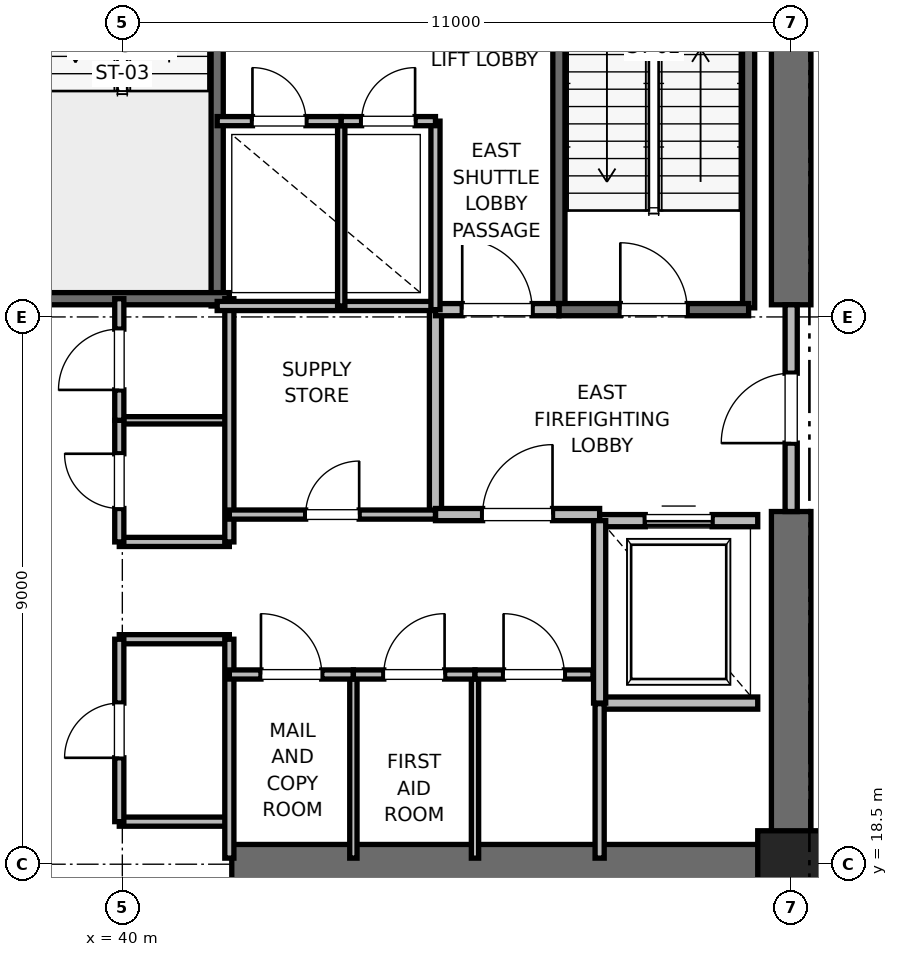
"""IFC4 building model, lengths in metres.
Left out: names, types, materials, properties, quantities, classifications, styles, units other than length and angle.
Written with IfcOpenShell. Run it as: python <this file> out.ifc"""

import sys

from ifc_helpers import new_model, si_unit, direction, frame, frame_2d, origin, origin_2d, place, context, subcontext, project, spatial, rectangle, extrude, element, fill, save


model = new_model("IFC4")
c1 = context("Model", 3, precision=1e-05, world=origin(), true_north=direction((0.0, 1.0)))
c2 = subcontext(c1, "Body", "Model", "MODEL_VIEW")
j1 = project(units=[si_unit("LENGTHUNIT", "METRE"), si_unit("PLANEANGLEUNIT", "RADIAN")], contexts=[c1])
p1 = place(None, origin())
s1 = spatial("IfcSite", under=j1, at=p1, CompositionType="ELEMENT")
p2 = place(p1, origin())
s2 = spatial("IfcBuilding", under=s1, at=p2, CompositionType="ELEMENT")
p3 = place(p2, frame((0.0, 0.0, 51.6)))
s3 = spatial("IfcBuildingStorey", under=s2, at=p3, CompositionType="ELEMENT", Elevation=51.6)
p4 = place(p3, frame((51.0, 18.5, 0.0), z_axis=(0.0, 0.0, 1.0), x_axis=(1.0, 0.0, 0.0)))
e1 = element("IfcColumn", 1, at=p4, inside=s3, PredefinedType="PILASTER", context=c2, shape_type="SweptSolid", body=[
    extrude(rectangle(XDim=1.1, YDim=1.1, at=origin_2d()), origin(), (0.0, 0.0, 1.0), 4.0),
])
p5 = place(p3, frame((41.8, 18.5, 0.0), z_axis=(0.0, 0.0, 1.0), x_axis=(1.0, 0.0, 0.0)))
e2 = element("IfcWall", 2, at=p5, inside=s3, PredefinedType="SHEAR", context=c2, shape_type="SweptSolid", body=[
    extrude(rectangle(XDim=9.2, YDim=0.65, at=frame_2d((4.6, 0.0))), origin(), (0.0, 0.0, 1.0), 3.76),
])
p6 = place(p3, frame((51.0, 18.5, 0.0), z_axis=(0.0, 0.0, 1.0), x_axis=(0.0, 1.0, 0.0)))
e3 = element("IfcWall", 3, at=p6, inside=s3, PredefinedType="SHEAR", context=c2, shape_type="SweptSolid", body=[
    extrude(rectangle(XDim=5.8, YDim=0.65, at=frame_2d((2.9, 0.0))), origin(), (0.0, 0.0, 1.0), 3.76),
])
p7 = place(p3, frame((51.0, 27.7, 0.0), z_axis=(0.0, 0.0, 1.0), x_axis=(0.0, 1.0, 0.0)))
e4 = element("IfcWall", 4, at=p7, inside=s3, PredefinedType="SHEAR", context=c2, shape_type="SweptSolid", body=[
    extrude(rectangle(XDim=8.8, YDim=0.65, at=frame_2d((4.4, 0.0))), origin(), (0.0, 0.0, 1.0), 3.76),
])
p8 = place(p3, frame((50.3, 27.65, 0.0), z_axis=(0.0, 0.0, 1.0), x_axis=(0.0, 1.0, 0.0)))
e5 = element("IfcWall", 5, at=p8, inside=s3, PredefinedType="SOLIDWALL", context=c2, shape_type="SweptSolid", body=[
    extrude(rectangle(XDim=8.15, YDim=0.2, at=frame_2d((4.075, 0.0))), origin(), (0.0, 0.0, 1.0), 3.76),
])
p9 = place(p3, frame((47.18, 27.62, 0.0), z_axis=(0.0, 0.0, 1.0), x_axis=(0.0, 1.0, 0.0)))
e6 = element("IfcWall", 6, at=p9, inside=s3, PredefinedType="SOLIDWALL", context=c2, shape_type="SweptSolid", body=[
    extrude(rectangle(XDim=8.18, YDim=0.2, at=frame_2d((4.09, 0.0))), origin(), (0.0, 0.0, 1.0), 3.76),
])
p10 = place(p3, frame((47.18, 27.62, 0.0), z_axis=(0.0, 0.0, 1.0), x_axis=(1.0, 0.0, 0.0)))
e7 = element("IfcWall", 7, at=p10, inside=s3, PredefinedType="SOLIDWALL", context=c2, shape_type="SweptSolid", body=[
    extrude(rectangle(XDim=3.12, YDim=0.2, at=frame_2d((1.56, 0.0))), origin(), (0.0, 0.0, 1.0), 3.76),
])
p11 = place(p10, frame((1.01, 0.0, 0.0)))
e8 = element("IfcOpeningElement", 8, at=p11, cuts=e7, PredefinedType="OPENING", context=c2, shape_type="SweptSolid", body=[
    extrude(rectangle(XDim=1.1, YDim=2.15, at=frame_2d((0.55, 1.075))), frame((0.0, 0.1, 0.0), z_axis=(0.0, -1.0, 0.0), x_axis=(1.0, 0.0, 0.0)), (0.0, 0.0, 1.0), 0.2),
])
p12 = place(p3, frame((41.56, 27.68, 0.0), z_axis=(0.0, 0.0, 1.0), x_axis=(0.0, 1.0, 0.0)))
e9 = element("IfcWall", 9, at=p12, inside=s3, PredefinedType="SOLIDWALL", context=c2, shape_type="SweptSolid", body=[
    extrude(rectangle(XDim=8.57, YDim=0.2, at=frame_2d((4.285, 0.0))), origin(), (0.0, 0.0, 1.0), 3.76),
])
p13 = place(p3, frame((38.44, 27.8, 0.0), z_axis=(0.0, 0.0, 1.0), x_axis=(1.0, 0.0, 0.0)))
e10 = element("IfcWall", 10, at=p13, inside=s3, PredefinedType="SOLIDWALL", context=c2, shape_type="SweptSolid", body=[
    extrude(rectangle(XDim=3.32, YDim=0.2, at=frame_2d((1.66, 0.0))), origin(), (0.0, 0.0, 1.0), 3.76),
])
p14 = place(p3, frame((45.15, 24.25, 0.0), z_axis=(0.0, 0.0, 1.0), x_axis=(0.0, 1.0, 0.0)))
e11 = element("IfcWall", 11, at=p14, inside=s3, PredefinedType="PARTITIONING", context=c2, shape_type="SweptSolid", body=[
    extrude(rectangle(XDim=3.37, YDim=0.2, at=frame_2d((1.685, 0.0))), origin(), (0.0, 0.0, 1.0), 3.76),
])
p15 = place(p3, frame((45.15, 24.25, 0.0), z_axis=(0.0, 0.0, 1.0), x_axis=(1.0, 0.0, 0.0)))
e12 = element("IfcWall", 12, at=p15, inside=s3, PredefinedType="PARTITIONING", context=c2, shape_type="SweptSolid", body=[
    extrude(rectangle(XDim=2.7, YDim=0.2, at=frame_2d((1.35, 0.0))), origin(), (0.0, 0.0, 1.0), 3.76),
])
p16 = place(p15, frame((0.775, 0.0, 0.0)))
e13 = element("IfcOpeningElement", 13, at=p16, cuts=e12, PredefinedType="OPENING", context=c2, shape_type="SweptSolid", body=[
    extrude(rectangle(XDim=1.15, YDim=2.2, at=frame_2d((0.575, 1.1))), frame((0.0, 0.1, 0.0), z_axis=(0.0, -1.0, 0.0), x_axis=(1.0, 0.0, 0.0)), (0.0, 0.0, 1.0), 0.2),
])
p17 = place(p3, frame((45.15, 27.62, 0.0), z_axis=(0.0, 0.0, 1.0), x_axis=(1.0, 0.0, 0.0)))
e14 = element("IfcWall", 14, at=p17, inside=s3, PredefinedType="PARTITIONING", context=c2, shape_type="SweptSolid", body=[
    extrude(rectangle(XDim=2.03, YDim=0.2, at=frame_2d((1.015, 0.0))), origin(), (0.0, 0.0, 1.0), 3.76),
])
p18 = place(p17, frame((0.44, 0.0, 0.0)))
e15 = element("IfcOpeningElement", 15, at=p18, cuts=e14, PredefinedType="OPENING", context=c2, shape_type="SweptSolid", body=[
    extrude(rectangle(XDim=1.15, YDim=2.2, at=frame_2d((0.575, 1.1))), frame((0.0, 0.1, 0.0), z_axis=(0.0, -1.0, 0.0), x_axis=(1.0, 0.0, 0.0)), (0.0, 0.0, 1.0), 0.2),
])
p19 = place(p3, frame((51.0, 24.3, 0.0), z_axis=(0.0, 0.0, 1.0), x_axis=(0.0, 1.0, 0.0)))
e16 = element("IfcWall", 16, at=p19, inside=s3, PredefinedType="PARTITIONING", context=c2, shape_type="SweptSolid", body=[
    extrude(rectangle(XDim=3.4, YDim=0.2, at=frame_2d((1.7, 0.0))), origin(), (0.0, 0.0, 1.0), 2.54),
])
p20 = place(p19, frame((1.125, 0.0, 0.0)))
e17 = element("IfcOpeningElement", 17, at=p20, cuts=e16, PredefinedType="OPENING", context=c2, shape_type="SweptSolid", body=[
    extrude(rectangle(XDim=1.15, YDim=2.2, at=frame_2d((0.575, 1.1))), frame((0.0, 0.1, 0.0), z_axis=(0.0, -1.0, 0.0), x_axis=(1.0, 0.0, 0.0)), (0.0, 0.0, 1.0), 0.2),
])
p21 = place(p3, frame((47.85, 21.15, 0.0), z_axis=(0.0, 0.0, 1.0), x_axis=(1.0, 0.0, 0.0)))
e18 = element("IfcWall", 18, at=p21, inside=s3, PredefinedType="SOLIDWALL", context=c2, shape_type="SweptSolid", body=[
    extrude(rectangle(XDim=2.6, YDim=0.2, at=frame_2d((1.3, 0.0))), origin(), (0.0, 0.0, 1.0), 3.76),
])
p22 = place(p3, frame((50.45, 24.15, 0.0), z_axis=(0.0, 0.0, 1.0), x_axis=(-1.0, 0.0, 0.0)))
e19 = element("IfcWall", 19, at=p22, inside=s3, PredefinedType="SOLIDWALL", context=c2, shape_type="SweptSolid", body=[
    extrude(rectangle(XDim=2.6, YDim=0.2, at=frame_2d((1.3, 0.0))), origin(), (0.0, 0.0, 1.0), 2.54),
])
p23 = place(p22, frame((0.75, 0.0, 0.0)))
e20 = element("IfcOpeningElement", 20, at=p23, cuts=e19, PredefinedType="OPENING", context=c2, shape_type="SweptSolid", body=[
    extrude(rectangle(XDim=1.1, YDim=2.2, at=frame_2d((0.55, 1.1))), frame((0.0, 0.1, 0.0), z_axis=(0.0, -1.0, 0.0), x_axis=(1.0, 0.0, 0.0)), (0.0, 0.0, 1.0), 0.2),
])
p24 = place(p3, frame((47.85, 24.15, 0.0), z_axis=(0.0, 0.0, 1.0), x_axis=(0.0, -1.0, 0.0)))
e21 = element("IfcWall", 21, at=p24, inside=s3, PredefinedType="SOLIDWALL", context=c2, shape_type="SweptSolid", body=[
    extrude(rectangle(XDim=3.0, YDim=0.2, at=frame_2d((1.5, 0.0))), origin(), (0.0, 0.0, 1.0), 3.76),
])
for number, where, z_axis, x_axis in (
    (22, (39.95, 19.2, 0.0), (0.0, 0.0, 1.0), (1.0, 0.0, 0.0)),
    (23, (39.95, 22.2, 0.0), (0.0, 0.0, 1.0), (1.0, 0.0, 0.0)),
    (24, (39.95, 23.8, 0.0), (0.0, 0.0, 1.0), (1.0, 0.0, 0.0)),
):
    element("IfcWall", number, at=place(p3, frame(where, z_axis=z_axis, x_axis=x_axis)), inside=s3, PredefinedType="PARTITIONING", context=c2, shape_type="SweptSolid", body=[
        extrude(rectangle(XDim=1.81, YDim=0.15, at=frame_2d((0.905, 0.0))), origin(), (0.0, 0.0, 1.0), 2.85),
    ])
p25 = place(p3, frame((39.95, 25.8, 0.0), z_axis=(0.0, 0.0, 1.0), x_axis=(1.0, 0.0, 0.0)))
e25 = element("IfcWall", 25, at=p25, inside=s3, PredefinedType="PARTITIONING", context=c2, shape_type="SweptSolid", body=[
    extrude(rectangle(XDim=1.81, YDim=0.12, at=frame_2d((0.905, 0.0))), origin(), (0.0, 0.0, 1.0), 2.85),
])
p26 = place(p3, frame((41.76, 18.6, 0.0), z_axis=(0.0, 0.0, 1.0), x_axis=(0.0, 1.0, 0.0)))
e26 = element("IfcWall", 26, at=p26, inside=s3, PredefinedType="PARTITIONING", context=c2, shape_type="SweptSolid", body=[
    extrude(rectangle(XDim=3.6, YDim=0.15, at=frame_2d((1.8, 0.0))), origin(), (0.0, 0.0, 1.0), 2.54),
])
p27 = place(p3, frame((41.76, 23.8, 0.0), z_axis=(0.0, 0.0, 1.0), x_axis=(0.0, 1.0, 0.0)))
e27 = element("IfcWall", 27, at=p27, inside=s3, PredefinedType="PARTITIONING", context=c2, shape_type="SweptSolid", body=[
    extrude(rectangle(XDim=4.0, YDim=0.15, at=frame_2d((2.0, 0.0))), origin(), (0.0, 0.0, 1.0), 2.85),
])
p28 = place(p3, frame((39.95, 19.2, 0.0), z_axis=(0.0, 0.0, 1.0), x_axis=(0.0, 1.0, 0.0)))
e28 = element("IfcWall", 28, at=p28, inside=s3, PredefinedType="PARTITIONING", context=c2, shape_type="SweptSolid", body=[
    extrude(rectangle(XDim=3.0, YDim=0.15, at=frame_2d((1.5, 0.0))), origin(), (0.0, 0.0, 1.0), 2.85),
])
p29 = place(p28, frame((1.05, 0.0, 0.0)))
e29 = element("IfcOpeningElement", 29, at=p29, cuts=e28, PredefinedType="OPENING", context=c2, shape_type="SweptSolid", body=[
    extrude(rectangle(XDim=0.9, YDim=2.1, at=frame_2d((0.45, 1.05))), frame((0.0, 0.075, 0.0), z_axis=(0.0, -1.0, 0.0), x_axis=(1.0, 0.0, 0.0)), (0.0, 0.0, 1.0), 0.15),
])
p30 = place(p3, frame((39.95, 23.8, 0.0), z_axis=(0.0, 0.0, 1.0), x_axis=(0.0, 1.0, 0.0)))
e30 = element("IfcWall", 30, at=p30, inside=s3, PredefinedType="PARTITIONING", context=c2, shape_type="SweptSolid", body=[
    extrude(rectangle(XDim=2.0, YDim=0.15, at=frame_2d((1.0, 0.0))), origin(), (0.0, 0.0, 1.0), 2.85),
])
p31 = place(p30, frame((0.55, 0.0, 0.0)))
e31 = element("IfcOpeningElement", 31, at=p31, cuts=e30, PredefinedType="OPENING", context=c2, shape_type="SweptSolid", body=[
    extrude(rectangle(XDim=0.9, YDim=2.1, at=frame_2d((0.45, 1.05))), frame((0.0, 0.075, 0.0), z_axis=(0.0, -1.0, 0.0), x_axis=(1.0, 0.0, 0.0)), (0.0, 0.0, 1.0), 0.15),
])
p32 = place(p3, frame((39.95, 25.8, 0.0), z_axis=(0.0, 0.0, 1.0), x_axis=(0.0, 1.0, 0.0)))
e32 = element("IfcWall", 32, at=p32, inside=s3, PredefinedType="PARTITIONING", context=c2, shape_type="SweptSolid", body=[
    extrude(rectangle(XDim=2.0, YDim=0.15, at=frame_2d((1.0, 0.0))), origin(), (0.0, 0.0, 1.0), 2.85),
])
p33 = place(p32, frame((0.5, 0.0, 0.0)))
e33 = element("IfcOpeningElement", 33, at=p33, cuts=e32, PredefinedType="OPENING", context=c2, shape_type="SweptSolid", body=[
    extrude(rectangle(XDim=1.0, YDim=2.15, at=frame_2d((0.5, 1.075))), frame((0.0, 0.075, 0.0), z_axis=(0.0, -1.0, 0.0), x_axis=(1.0, 0.0, 0.0)), (0.0, 0.0, 1.0), 0.15),
])
p34 = place(p3, frame((41.56, 27.68, 0.0), z_axis=(0.0, 0.0, 1.0), x_axis=(1.0, 0.0, 0.0)))
e34 = element("IfcWall", 34, at=p34, inside=s3, PredefinedType="PARTITIONING", context=c2, shape_type="SweptSolid", body=[
    extrude(rectangle(XDim=3.59, YDim=0.15, at=frame_2d((1.795, 0.0))), origin(), (0.0, 0.0, 1.0), 2.85),
])
p35 = place(p3, frame((47.85, 18.6, 0.0), z_axis=(0.0, 0.0, 1.0), x_axis=(0.0, 1.0, 0.0)))
e35 = element("IfcWall", 35, at=p35, inside=s3, PredefinedType="PARTITIONING", context=c2, shape_type="SweptSolid", body=[
    extrude(rectangle(XDim=2.54, YDim=0.15, at=frame_2d((1.27, 0.0))), origin(), (0.0, 0.0, 1.0), 2.85),
])
for number, where, z_axis, x_axis in (
    (36, (43.8, 18.6, 0.0), (0.0, 0.0, 1.0), (0.0, 1.0, 0.0)),
    (37, (45.8, 18.6, 0.0), (0.0, 0.0, 1.0), (0.0, 1.0, 0.0)),
):
    element("IfcWall", number, at=place(p3, frame(where, z_axis=z_axis, x_axis=x_axis)), inside=s3, PredefinedType="PARTITIONING", context=c2, shape_type="SweptSolid", body=[
        extrude(rectangle(XDim=3.02, YDim=0.12, at=frame_2d((1.51, 0.0))), origin(), (0.0, 0.0, 1.0), 2.85),
    ])
p36 = place(p3, frame((41.76, 21.62, 0.0), z_axis=(0.0, 0.0, 1.0), x_axis=(1.0, 0.0, 0.0)))
e38 = element("IfcWall", 38, at=p36, inside=s3, PredefinedType="PARTITIONING", context=c2, shape_type="SweptSolid", body=[
    extrude(rectangle(XDim=2.04, YDim=0.15, at=frame_2d((1.02, 0.0))), origin(), (0.0, 0.0, 1.0), 2.85),
])
p37 = place(p36, frame((0.52, 0.0, 0.0)))
e39 = element("IfcOpeningElement", 39, at=p37, cuts=e38, PredefinedType="OPENING", context=c2, shape_type="SweptSolid", body=[
    extrude(rectangle(XDim=1.0, YDim=2.15, at=frame_2d((0.5, 1.075))), frame((0.0, 0.075, 0.0), z_axis=(0.0, -1.0, 0.0), x_axis=(1.0, 0.0, 0.0)), (0.0, 0.0, 1.0), 0.15),
])
p38 = place(p3, frame((43.8, 21.62, 0.0), z_axis=(0.0, 0.0, 1.0), x_axis=(1.0, 0.0, 0.0)))
e40 = element("IfcWall", 40, at=p38, inside=s3, PredefinedType="PARTITIONING", context=c2, shape_type="SweptSolid", body=[
    extrude(rectangle(XDim=2.0, YDim=0.15, at=frame_2d((1.0, 0.0))), origin(), (0.0, 0.0, 1.0), 2.85),
])
p39 = place(p38, frame((0.5, 0.0, 0.0)))
e41 = element("IfcOpeningElement", 41, at=p39, cuts=e40, PredefinedType="OPENING", context=c2, shape_type="SweptSolid", body=[
    extrude(rectangle(XDim=1.0, YDim=2.15, at=frame_2d((0.5, 1.075))), frame((0.0, 0.075, 0.0), z_axis=(0.0, -1.0, 0.0), x_axis=(1.0, 0.0, 0.0)), (0.0, 0.0, 1.0), 0.15),
])
p40 = place(p3, frame((45.8, 21.62, 0.0), z_axis=(0.0, 0.0, 1.0), x_axis=(1.0, 0.0, 0.0)))
e42 = element("IfcWall", 42, at=p40, inside=s3, PredefinedType="PARTITIONING", context=c2, shape_type="SweptSolid", body=[
    extrude(rectangle(XDim=1.94, YDim=0.15, at=frame_2d((0.97, 0.0))), origin(), (0.0, 0.0, 1.0), 2.85),
])
p41 = place(p40, frame((0.47, 0.0, 0.0)))
e43 = element("IfcOpeningElement", 43, at=p41, cuts=e42, PredefinedType="OPENING", context=c2, shape_type="SweptSolid", body=[
    extrude(rectangle(XDim=1.0, YDim=2.15, at=frame_2d((0.5, 1.075))), frame((0.0, 0.075, 0.0), z_axis=(0.0, -1.0, 0.0), x_axis=(1.0, 0.0, 0.0)), (0.0, 0.0, 1.0), 0.15),
])
p42 = place(p3, frame((41.76, 24.25, 0.0), z_axis=(0.0, 0.0, 1.0), x_axis=(1.0, 0.0, 0.0)))
e44 = element("IfcWall", 44, at=p42, inside=s3, PredefinedType="PARTITIONING", context=c2, shape_type="SweptSolid", body=[
    extrude(rectangle(XDim=3.39, YDim=0.15, at=frame_2d((1.695, 0.0))), origin(), (0.0, 0.0, 1.0), 2.85),
])
p43 = place(p42, frame((1.255, 0.0, 0.0)))
e45 = element("IfcOpeningElement", 45, at=p43, cuts=e44, PredefinedType="OPENING", context=c2, shape_type="SweptSolid", body=[
    extrude(rectangle(XDim=0.88, YDim=2.1, at=frame_2d((0.44, 1.05))), frame((0.0, 0.075, 0.0), z_axis=(0.0, -1.0, 0.0), x_axis=(1.0, 0.0, 0.0)), (0.0, 0.0, 1.0), 0.15),
])
p44 = place(p3, frame((45.15, 27.62, 0.0), z_axis=(0.0, 0.0, 1.0), x_axis=(0.0, 1.0, 0.0)))
e46 = element("IfcWall", 46, at=p44, inside=s3, PredefinedType="PARTITIONING", context=c2, shape_type="SweptSolid", body=[
    extrude(rectangle(XDim=3.1, YDim=0.15, at=frame_2d((1.55, 0.0))), origin(), (0.0, 0.0, 1.0), 2.85),
])
p45 = place(p3, frame((43.6, 27.68, 0.0), z_axis=(0.0, 0.0, 1.0), x_axis=(0.0, 1.0, 0.0)))
e47 = element("IfcWall", 47, at=p45, inside=s3, PredefinedType="PARTITIONING", context=c2, shape_type="SweptSolid", body=[
    extrude(rectangle(XDim=3.04, YDim=0.12, at=frame_2d((1.52, 0.0))), origin(), (0.0, 0.0, 1.0), 2.85),
])
p46 = place(p3, frame((41.56, 30.72, 0.0), z_axis=(0.0, 0.0, 1.0), x_axis=(1.0, 0.0, 0.0)))
e48 = element("IfcWall", 48, at=p46, inside=s3, PredefinedType="PARTITIONING", context=c2, shape_type="SweptSolid", body=[
    extrude(rectangle(XDim=2.04, YDim=0.15, at=frame_2d((1.02, 0.0))), origin(), (0.0, 0.0, 1.0), 2.85),
])
p47 = place(p46, frame((0.58, 0.0, 0.0)))
e49 = element("IfcOpeningElement", 49, at=p47, cuts=e48, PredefinedType="OPENING", context=c2, shape_type="SweptSolid", body=[
    extrude(rectangle(XDim=0.88, YDim=2.1, at=frame_2d((0.44, 1.05))), frame((0.0, 0.075, 0.0), z_axis=(0.0, -1.0, 0.0), x_axis=(1.0, 0.0, 0.0)), (0.0, 0.0, 1.0), 0.15),
])
p48 = place(p3, frame((43.6, 30.72, 0.0), z_axis=(0.0, 0.0, 1.0), x_axis=(1.0, 0.0, 0.0)))
e50 = element("IfcWall", 50, at=p48, inside=s3, PredefinedType="PARTITIONING", context=c2, shape_type="SweptSolid", body=[
    extrude(rectangle(XDim=1.55, YDim=0.15, at=frame_2d((0.775, 0.0))), origin(), (0.0, 0.0, 1.0), 2.85),
])
p49 = place(p48, frame((0.335, 0.0, 0.0)))
e51 = element("IfcOpeningElement", 51, at=p49, cuts=e50, PredefinedType="OPENING", context=c2, shape_type="SweptSolid", body=[
    extrude(rectangle(XDim=0.88, YDim=2.1, at=frame_2d((0.44, 1.05))), frame((0.0, 0.075, 0.0), z_axis=(0.0, -1.0, 0.0), x_axis=(1.0, 0.0, 0.0)), (0.0, 0.0, 1.0), 0.15),
])
p50 = place(p11, origin())
e52 = element("IfcDoor", 52, at=p50, inside=s3, OperationType="SINGLE_SWING_LEFT", PredefinedType="DOOR", context=c2, shape_type="SweptSolid", body=[
    extrude(rectangle(XDim=1.1, YDim=2.15, at=frame_2d((0.55, 1.075))), frame((0.0, 0.025, 0.0), z_axis=(0.0, -1.0, 0.0), x_axis=(1.0, 0.0, 0.0)), (0.0, 0.0, 1.0), 0.05),
])
fill(e8, e52)
p51 = place(p16, origin())
e53 = element("IfcDoor", 53, at=p51, inside=s3, OperationType="SINGLE_SWING_RIGHT", PredefinedType="DOOR", context=c2, shape_type="SweptSolid", body=[
    extrude(rectangle(XDim=1.15, YDim=2.2, at=frame_2d((0.575, 1.1))), frame((0.0, 0.025, 0.0), z_axis=(0.0, -1.0, 0.0), x_axis=(1.0, 0.0, 0.0)), (0.0, 0.0, 1.0), 0.05),
])
fill(e13, e53)
p52 = place(p18, origin())
e54 = element("IfcDoor", 54, at=p52, inside=s3, OperationType="SINGLE_SWING_LEFT", PredefinedType="DOOR", context=c2, shape_type="SweptSolid", body=[
    extrude(rectangle(XDim=1.15, YDim=2.2, at=frame_2d((0.575, 1.1))), frame((0.0, 0.025, 0.0), z_axis=(0.0, -1.0, 0.0), x_axis=(1.0, 0.0, 0.0)), (0.0, 0.0, 1.0), 0.05),
])
fill(e15, e54)
p53 = place(p20, origin())
e55 = element("IfcDoor", 55, at=p53, inside=s3, OperationType="SINGLE_SWING_LEFT", PredefinedType="DOOR", context=c2, shape_type="SweptSolid", body=[
    extrude(rectangle(XDim=1.15, YDim=2.2, at=frame_2d((0.575, 1.1))), frame((0.0, 0.025, 0.0), z_axis=(0.0, -1.0, 0.0), x_axis=(1.0, 0.0, 0.0)), (0.0, 0.0, 1.0), 0.05),
])
fill(e17, e55)
p54 = place(p23, origin())
e56 = element("IfcDoor", 56, at=p54, inside=s3, OperationType="SLIDING_TO_RIGHT", PredefinedType="DOOR", context=c2, shape_type="SweptSolid", body=[
    extrude(rectangle(XDim=1.1, YDim=2.2, at=frame_2d((0.55, 1.1))), frame((0.0, 0.025, 0.0), z_axis=(0.0, -1.0, 0.0), x_axis=(1.0, 0.0, 0.0)), (0.0, 0.0, 1.0), 0.05),
])
fill(e20, e56)
p55 = place(p29, origin())
e57 = element("IfcDoor", 57, at=p55, inside=s3, OperationType="SINGLE_SWING_LEFT", PredefinedType="DOOR", context=c2, shape_type="SweptSolid", body=[
    extrude(rectangle(XDim=0.9, YDim=2.1, at=frame_2d((0.45, 1.05))), frame((0.0, 0.025, 0.0), z_axis=(0.0, -1.0, 0.0), x_axis=(1.0, 0.0, 0.0)), (0.0, 0.0, 1.0), 0.05),
])
fill(e29, e57)
p56 = place(p31, origin())
e58 = element("IfcDoor", 58, at=p56, inside=s3, OperationType="SINGLE_SWING_RIGHT", PredefinedType="DOOR", context=c2, shape_type="SweptSolid", body=[
    extrude(rectangle(XDim=0.9, YDim=2.1, at=frame_2d((0.45, 1.05))), frame((0.0, 0.025, 0.0), z_axis=(0.0, -1.0, 0.0), x_axis=(1.0, 0.0, 0.0)), (0.0, 0.0, 1.0), 0.05),
])
fill(e31, e58)
p57 = place(p33, origin())
e59 = element("IfcDoor", 59, at=p57, inside=s3, OperationType="SINGLE_SWING_LEFT", PredefinedType="DOOR", context=c2, shape_type="SweptSolid", body=[
    extrude(rectangle(XDim=1.0, YDim=2.15, at=frame_2d((0.5, 1.075))), frame((0.0, 0.025, 0.0), z_axis=(0.0, -1.0, 0.0), x_axis=(1.0, 0.0, 0.0)), (0.0, 0.0, 1.0), 0.05),
])
fill(e33, e59)
p58 = place(p37, origin())
e60 = element("IfcDoor", 60, at=p58, inside=s3, OperationType="SINGLE_SWING_LEFT", PredefinedType="DOOR", context=c2, shape_type="SweptSolid", body=[
    extrude(rectangle(XDim=1.0, YDim=2.15, at=frame_2d((0.5, 1.075))), frame((0.0, 0.025, 0.0), z_axis=(0.0, -1.0, 0.0), x_axis=(1.0, 0.0, 0.0)), (0.0, 0.0, 1.0), 0.05),
])
fill(e39, e60)
p59 = place(p39, origin())
e61 = element("IfcDoor", 61, at=p59, inside=s3, OperationType="SINGLE_SWING_RIGHT", PredefinedType="DOOR", context=c2, shape_type="SweptSolid", body=[
    extrude(rectangle(XDim=1.0, YDim=2.15, at=frame_2d((0.5, 1.075))), frame((0.0, 0.025, 0.0), z_axis=(0.0, -1.0, 0.0), x_axis=(1.0, 0.0, 0.0)), (0.0, 0.0, 1.0), 0.05),
])
fill(e41, e61)
p60 = place(p41, origin())
e62 = element("IfcDoor", 62, at=p60, inside=s3, OperationType="SINGLE_SWING_LEFT", PredefinedType="DOOR", context=c2, shape_type="SweptSolid", body=[
    extrude(rectangle(XDim=1.0, YDim=2.15, at=frame_2d((0.5, 1.075))), frame((0.0, 0.025, 0.0), z_axis=(0.0, -1.0, 0.0), x_axis=(1.0, 0.0, 0.0)), (0.0, 0.0, 1.0), 0.05),
])
fill(e43, e62)
p61 = place(p43, origin())
e63 = element("IfcDoor", 63, at=p61, inside=s3, OperationType="SINGLE_SWING_RIGHT", PredefinedType="DOOR", context=c2, shape_type="SweptSolid", body=[
    extrude(rectangle(XDim=0.88, YDim=2.1, at=frame_2d((0.44, 1.05))), frame((0.0, 0.025, 0.0), z_axis=(0.0, -1.0, 0.0), x_axis=(1.0, 0.0, 0.0)), (0.0, 0.0, 1.0), 0.05),
])
fill(e45, e63)
p62 = place(p47, origin())
e64 = element("IfcDoor", 64, at=p62, inside=s3, OperationType="SINGLE_SWING_LEFT", PredefinedType="DOOR", context=c2, shape_type="SweptSolid", body=[
    extrude(rectangle(XDim=0.88, YDim=2.1, at=frame_2d((0.44, 1.05))), frame((0.0, 0.025, 0.0), z_axis=(0.0, -1.0, 0.0), x_axis=(1.0, 0.0, 0.0)), (0.0, 0.0, 1.0), 0.05),
])
fill(e49, e64)
p63 = place(p49, origin())
e65 = element("IfcDoor", 65, at=p63, inside=s3, OperationType="SINGLE_SWING_RIGHT", PredefinedType="DOOR", context=c2, shape_type="SweptSolid", body=[
    extrude(rectangle(XDim=0.88, YDim=2.1, at=frame_2d((0.44, 1.05))), frame((0.0, 0.025, 0.0), z_axis=(0.0, -1.0, 0.0), x_axis=(1.0, 0.0, 0.0)), (0.0, 0.0, 1.0), 0.05),
])
fill(e51, e65)
save(model, sys.argv[1])
